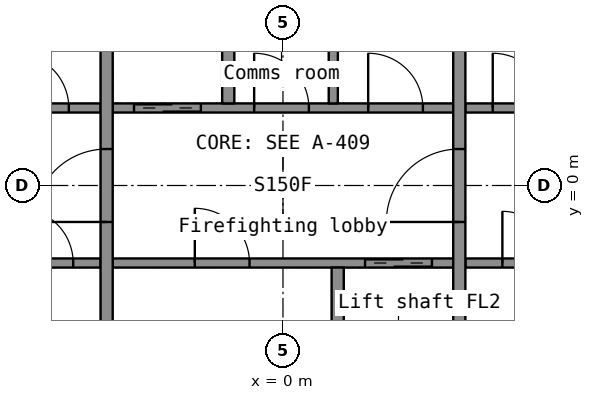
"""IFC4 building model, lengths in metres.
Left out: names, types, materials, properties, quantities, classifications, styles, units other than length and angle.
Written with IfcOpenShell. Run it as: python <this file> out.ifc"""

import sys

from ifc_helpers import new_model, si_unit, direction, frame, frame_2d, origin, place, context, subcontext, project, spatial, rectangle, extrude, element, fill, save


model = new_model("IFC4")
c1 = context("Model", 3, precision=1e-05, world=origin(), true_north=direction((0.0, 1.0)))
c2 = subcontext(c1, "Body", "Model", "MODEL_VIEW")
j1 = project(units=[si_unit("LENGTHUNIT", "METRE"), si_unit("PLANEANGLEUNIT", "RADIAN")], contexts=[c1])
p1 = place(None, origin())
s1 = spatial("IfcSite", under=j1, at=p1, CompositionType="ELEMENT")
p2 = place(p1, origin())
s2 = spatial("IfcBuilding", under=s1, at=p2, CompositionType="ELEMENT")
p3 = place(p2, frame((0.0, 0.0, 55.6)))
s3 = spatial("IfcBuildingStorey", under=s2, at=p3, CompositionType="ELEMENT", Elevation=55.6)
p4 = place(p3, frame((-11.4, -1.275, 0.0), z_axis=(0.0, 0.0, 1.0), x_axis=(1.0, 0.0, 0.0)))
e1 = element("IfcWall", 1, at=p4, inside=s3, PredefinedType="SHEAR", context=c2, shape_type="SweptSolid", body=[
    extrude(rectangle(XDim=8.4, YDim=0.15, at=frame_2d((4.2, 0.0))), origin(), (0.0, 0.0, 1.0), 3.3),
])
p5 = place(p4, frame((5.25, 0.0, 0.0)))
e2 = element("IfcOpeningElement", 2, at=p5, cuts=e1, PredefinedType="OPENING", context=c2, shape_type="SweptSolid", body=[
    extrude(rectangle(XDim=1.1, YDim=2.15, at=frame_2d((0.55, 1.075))), frame((0.0, 0.085, 0.0), z_axis=(0.0, -1.0, 0.0), x_axis=(1.0, 0.0, 0.0)), (0.0, 0.0, 1.0), 0.17),
])
p6 = place(p4, frame((7.05, 0.0, 0.0)))
e3 = element("IfcOpeningElement", 3, at=p6, cuts=e1, PredefinedType="OPENING", context=c2, shape_type="SweptSolid", body=[
    extrude(rectangle(XDim=0.9, YDim=2.1, at=frame_2d((0.45, 1.05))), frame((0.0, 0.085, 0.0), z_axis=(0.0, -1.0, 0.0), x_axis=(1.0, 0.0, 0.0)), (0.0, 0.0, 1.0), 0.17),
])
p7 = place(p3, frame((-2.8, -1.275, 0.0), z_axis=(0.0, 0.0, 1.0), x_axis=(1.0, 0.0, 0.0)))
e4 = element("IfcWall", 4, at=p7, inside=s3, PredefinedType="SHEAR", context=c2, shape_type="SweptSolid", body=[
    extrude(rectangle(XDim=5.6, YDim=0.15, at=frame_2d((2.8, 0.0))), origin(), (0.0, 0.0, 1.0), 3.3),
])
p8 = place(p7, frame((4.15, 0.0, 0.0)))
e5 = element("IfcOpeningElement", 5, at=p8, cuts=e4, PredefinedType="OPENING", context=c2, shape_type="SweptSolid", body=[
    extrude(rectangle(XDim=1.1, YDim=2.2, at=frame_2d((0.55, 1.1))), frame((0.0, 0.085, 0.0), z_axis=(0.0, -1.0, 0.0), x_axis=(1.0, 0.0, 0.0)), (0.0, 0.0, 1.0), 0.17),
])
p9 = place(p7, frame((1.35, 0.0, 0.0)))
e6 = element("IfcOpeningElement", 6, at=p9, cuts=e4, PredefinedType="OPENING", context=c2, shape_type="SweptSolid", body=[
    extrude(rectangle(XDim=0.9, YDim=2.1, at=frame_2d((0.45, 1.05))), frame((0.0, 0.085, 0.0), z_axis=(0.0, -1.0, 0.0), x_axis=(1.0, 0.0, 0.0)), (0.0, 0.0, 1.0), 0.17),
])
p10 = place(p3, frame((3.0, -1.275, 0.0), z_axis=(0.0, 0.0, 1.0), x_axis=(1.0, 0.0, 0.0)))
e7 = element("IfcWall", 7, at=p10, inside=s3, PredefinedType="PARTITIONING", context=c2, shape_type="SweptSolid", body=[
    extrude(rectangle(XDim=8.4, YDim=0.15, at=frame_2d((4.2, 0.0))), origin(), (0.0, 0.0, 1.0), 3.3),
])
p11 = place(p10, frame((0.608, 0.0, 0.0)))
e8 = element("IfcOpeningElement", 8, at=p11, cuts=e7, PredefinedType="OPENING", context=c2, shape_type="SweptSolid", body=[
    extrude(rectangle(XDim=0.85, YDim=2.1, at=frame_2d((0.425, 1.05))), frame((0.0, 0.085, 0.0), z_axis=(0.0, -1.0, 0.0), x_axis=(1.0, 0.0, 0.0)), (0.0, 0.0, 1.0), 0.17),
])
p12 = place(p10, frame((2.825, 0.0, 0.0)))
e9 = element("IfcOpeningElement", 9, at=p12, cuts=e7, PredefinedType="OPENING", context=c2, shape_type="SweptSolid", body=[
    extrude(rectangle(XDim=0.85, YDim=2.1, at=frame_2d((0.425, 1.05))), frame((0.0, 0.085, 0.0), z_axis=(0.0, -1.0, 0.0), x_axis=(1.0, 0.0, 0.0)), (0.0, 0.0, 1.0), 0.17),
])
p13 = place(p10, frame((4.938, 0.0, 0.0)))
e10 = element("IfcOpeningElement", 10, at=p13, cuts=e7, PredefinedType="OPENING", context=c2, shape_type="SweptSolid", body=[
    extrude(rectangle(XDim=0.9, YDim=2.1, at=frame_2d((0.45, 1.05))), frame((0.0, 0.085, 0.0), z_axis=(0.0, -1.0, 0.0), x_axis=(1.0, 0.0, 0.0)), (0.0, 0.0, 1.0), 0.17),
])
p14 = place(p10, frame((6.996, 0.0, 0.0)))
e11 = element("IfcOpeningElement", 11, at=p14, cuts=e7, PredefinedType="OPENING", context=c2, shape_type="SweptSolid", body=[
    extrude(rectangle(XDim=0.9, YDim=2.1, at=frame_2d((0.45, 1.05))), frame((0.0, 0.085, 0.0), z_axis=(0.0, -1.0, 0.0), x_axis=(1.0, 0.0, 0.0)), (0.0, 0.0, 1.0), 0.17),
])
p15 = place(p3, frame((-11.4, 1.275, 0.0), z_axis=(0.0, 0.0, 1.0), x_axis=(1.0, 0.0, 0.0)))
e12 = element("IfcWall", 12, at=p15, inside=s3, PredefinedType="PARTITIONING", context=c2, shape_type="SweptSolid", body=[
    extrude(rectangle(XDim=8.4, YDim=0.15, at=frame_2d((4.2, 0.0))), origin(), (0.0, 0.0, 1.0), 3.3),
])
p16 = place(p15, frame((1.114, 0.0, 0.0)))
e13 = element("IfcOpeningElement", 13, at=p16, cuts=e12, PredefinedType="OPENING", context=c2, shape_type="SweptSolid", body=[
    extrude(rectangle(XDim=0.85, YDim=2.1, at=frame_2d((0.425, 1.05))), frame((0.0, 0.085, 0.0), z_axis=(0.0, -1.0, 0.0), x_axis=(1.0, 0.0, 0.0)), (0.0, 0.0, 1.0), 0.17),
])
p17 = place(p15, frame((4.342, 0.0, 0.0)))
e14 = element("IfcOpeningElement", 14, at=p17, cuts=e12, PredefinedType="OPENING", context=c2, shape_type="SweptSolid", body=[
    extrude(rectangle(XDim=0.85, YDim=2.1, at=frame_2d((0.425, 1.05))), frame((0.0, 0.085, 0.0), z_axis=(0.0, -1.0, 0.0), x_axis=(1.0, 0.0, 0.0)), (0.0, 0.0, 1.0), 0.17),
])
p18 = place(p15, frame((6.978, 0.0, 0.0)))
e15 = element("IfcOpeningElement", 15, at=p18, cuts=e12, PredefinedType="OPENING", context=c2, shape_type="SweptSolid", body=[
    extrude(rectangle(XDim=0.9, YDim=2.1, at=frame_2d((0.45, 1.05))), frame((0.0, 0.085, 0.0), z_axis=(0.0, -1.0, 0.0), x_axis=(1.0, 0.0, 0.0)), (0.0, 0.0, 1.0), 0.17),
])
p19 = place(p3, frame((-2.8, 1.275, 0.0), z_axis=(0.0, 0.0, 1.0), x_axis=(1.0, 0.0, 0.0)))
e16 = element("IfcWall", 16, at=p19, inside=s3, PredefinedType="SHEAR", context=c2, shape_type="SweptSolid", body=[
    extrude(rectangle(XDim=5.6, YDim=0.15, at=frame_2d((2.8, 0.0))), origin(), (0.0, 0.0, 1.0), 3.3),
])
p20 = place(p19, frame((0.35, 0.0, 0.0)))
e17 = element("IfcOpeningElement", 17, at=p20, cuts=e16, PredefinedType="OPENING", context=c2, shape_type="SweptSolid", body=[
    extrude(rectangle(XDim=1.1, YDim=2.2, at=frame_2d((0.55, 1.1))), frame((0.0, 0.085, 0.0), z_axis=(0.0, -1.0, 0.0), x_axis=(1.0, 0.0, 0.0)), (0.0, 0.0, 1.0), 0.17),
])
p21 = place(p19, frame((2.326, 0.0, 0.0)))
e18 = element("IfcOpeningElement", 18, at=p21, cuts=e16, PredefinedType="OPENING", context=c2, shape_type="SweptSolid", body=[
    extrude(rectangle(XDim=0.9, YDim=2.1, at=frame_2d((0.45, 1.05))), frame((0.0, 0.085, 0.0), z_axis=(0.0, -1.0, 0.0), x_axis=(1.0, 0.0, 0.0)), (0.0, 0.0, 1.0), 0.17),
])
p22 = place(p19, frame((4.201, 0.0, 0.0)))
e19 = element("IfcOpeningElement", 19, at=p22, cuts=e16, PredefinedType="OPENING", context=c2, shape_type="SweptSolid", body=[
    extrude(rectangle(XDim=0.9, YDim=2.1, at=frame_2d((0.45, 1.05))), frame((0.0, 0.085, 0.0), z_axis=(0.0, -1.0, 0.0), x_axis=(1.0, 0.0, 0.0)), (0.0, 0.0, 1.0), 0.17),
])
p23 = place(p3, frame((3.0, 1.275, 0.0), z_axis=(0.0, 0.0, 1.0), x_axis=(1.0, 0.0, 0.0)))
e20 = element("IfcWall", 20, at=p23, inside=s3, PredefinedType="SHEAR", context=c2, shape_type="SweptSolid", body=[
    extrude(rectangle(XDim=8.4, YDim=0.15, at=frame_2d((4.2, 0.0))), origin(), (0.0, 0.0, 1.0), 3.3),
])
p24 = place(p23, frame((2.05, 0.0, 0.0)))
e21 = element("IfcOpeningElement", 21, at=p24, cuts=e20, PredefinedType="OPENING", context=c2, shape_type="SweptSolid", body=[
    extrude(rectangle(XDim=1.1, YDim=2.15, at=frame_2d((0.55, 1.075))), frame((0.0, 0.085, 0.0), z_axis=(0.0, -1.0, 0.0), x_axis=(1.0, 0.0, 0.0)), (0.0, 0.0, 1.0), 0.17),
])
p25 = place(p23, frame((0.45, 0.0, 0.0)))
e22 = element("IfcOpeningElement", 22, at=p25, cuts=e20, PredefinedType="OPENING", context=c2, shape_type="SweptSolid", body=[
    extrude(rectangle(XDim=0.9, YDim=2.1, at=frame_2d((0.45, 1.05))), frame((0.0, 0.085, 0.0), z_axis=(0.0, -1.0, 0.0), x_axis=(1.0, 0.0, 0.0)), (0.0, 0.0, 1.0), 0.17),
])
p26 = place(p3, frame((-2.9, -3.7, 0.0), z_axis=(0.0, 0.0, 1.0), x_axis=(0.0, 1.0, 0.0)))
e23 = element("IfcWall", 23, at=p26, inside=s3, PredefinedType="SHEAR", context=c2, shape_type="SweptSolid", body=[
    extrude(rectangle(XDim=7.4, YDim=0.2, at=frame_2d((3.7, 0.0))), origin(), (0.0, 0.0, 1.0), 3.3),
])
p27 = place(p26, frame((3.1, 0.0, 0.0)))
e24 = element("IfcOpeningElement", 24, at=p27, cuts=e23, PredefinedType="OPENING", context=c2, shape_type="SweptSolid", body=[
    extrude(rectangle(XDim=1.2, YDim=2.2, at=frame_2d((0.6, 1.1))), frame((0.0, 0.11, 0.0), z_axis=(0.0, -1.0, 0.0), x_axis=(1.0, 0.0, 0.0)), (0.0, 0.0, 1.0), 0.22),
])
p28 = place(p3, frame((2.9, -3.7, 0.0), z_axis=(0.0, 0.0, 1.0), x_axis=(0.0, 1.0, 0.0)))
e25 = element("IfcWall", 25, at=p28, inside=s3, PredefinedType="SHEAR", context=c2, shape_type="SweptSolid", body=[
    extrude(rectangle(XDim=7.4, YDim=0.2, at=frame_2d((3.7, 0.0))), origin(), (0.0, 0.0, 1.0), 3.3),
])
p29 = place(p28, frame((3.1, 0.0, 0.0)))
e26 = element("IfcOpeningElement", 26, at=p29, cuts=e25, PredefinedType="OPENING", context=c2, shape_type="SweptSolid", body=[
    extrude(rectangle(XDim=1.2, YDim=2.2, at=frame_2d((0.6, 1.1))), frame((0.0, 0.11, 0.0), z_axis=(0.0, -1.0, 0.0), x_axis=(1.0, 0.0, 0.0)), (0.0, 0.0, 1.0), 0.22),
])
for number, where, z_axis, x_axis in (
    (27, (-0.9, 1.35, 0.0), (0.0, 0.0, 1.0), (0.0, 1.0, 0.0)),
    (28, (0.9, -3.7, 0.0), (0.0, 0.0, 1.0), (0.0, 1.0, 0.0)),
):
    element("IfcWall", number, at=place(p3, frame(where, z_axis=z_axis, x_axis=x_axis)), inside=s3, PredefinedType="SHEAR", context=c2, shape_type="SweptSolid", body=[
        extrude(rectangle(XDim=2.35, YDim=0.2, at=frame_2d((1.175, 0.0))), origin(), (0.0, 0.0, 1.0), 3.3),
    ])
p30 = place(p3, frame((0.827, 1.35, 0.0), z_axis=(0.0, 0.0, 1.0), x_axis=(0.0, 1.0, 0.0)))
e29 = element("IfcWall", 29, at=p30, inside=s3, PredefinedType="PARTITIONING", context=c2, shape_type="SweptSolid", body=[
    extrude(rectangle(XDim=2.35, YDim=0.15, at=frame_2d((1.175, 0.0))), origin(), (0.0, 0.0, 1.0), 3.3),
])
p31 = place(p27, origin())
e30 = element("IfcDoor", 30, at=p31, inside=s3, OperationType="SINGLE_SWING_LEFT", PredefinedType="DOOR", context=c2, shape_type="SweptSolid", body=[
    extrude(rectangle(XDim=1.2, YDim=2.2, at=frame_2d((0.6, 1.1))), frame((0.0, 0.025, 0.0), z_axis=(0.0, -1.0, 0.0), x_axis=(1.0, 0.0, 0.0)), (0.0, 0.0, 1.0), 0.05),
])
fill(e24, e30)
p32 = place(p29, origin())
e31 = element("IfcDoor", 31, at=p32, inside=s3, OperationType="SINGLE_SWING_LEFT", PredefinedType="DOOR", context=c2, shape_type="SweptSolid", body=[
    extrude(rectangle(XDim=1.2, YDim=2.2, at=frame_2d((0.6, 1.1))), frame((0.0, 0.025, 0.0), z_axis=(0.0, -1.0, 0.0), x_axis=(1.0, 0.0, 0.0)), (0.0, 0.0, 1.0), 0.05),
])
fill(e26, e31)
p33 = place(p20, origin())
e32 = element("IfcDoor", 32, at=p33, inside=s3, OperationType="DOUBLE_DOOR_SLIDING", PredefinedType="DOOR", context=c2, shape_type="SweptSolid", body=[
    extrude(rectangle(XDim=1.1, YDim=2.2, at=frame_2d((0.55, 1.1))), frame((0.0, 0.025, 0.0), z_axis=(0.0, -1.0, 0.0), x_axis=(1.0, 0.0, 0.0)), (0.0, 0.0, 1.0), 0.05),
])
fill(e17, e32)
p34 = place(p8, origin())
e33 = element("IfcDoor", 33, at=p34, inside=s3, OperationType="DOUBLE_DOOR_SLIDING", PredefinedType="DOOR", context=c2, shape_type="SweptSolid", body=[
    extrude(rectangle(XDim=1.1, YDim=2.2, at=frame_2d((0.55, 1.1))), frame((0.0, 0.025, 0.0), z_axis=(0.0, -1.0, 0.0), x_axis=(1.0, 0.0, 0.0)), (0.0, 0.0, 1.0), 0.05),
])
fill(e5, e33)
p35 = place(p18, origin())
e34 = element("IfcDoor", 34, at=p35, inside=s3, OperationType="SINGLE_SWING_LEFT", PredefinedType="DOOR", context=c2, shape_type="SweptSolid", body=[
    extrude(rectangle(XDim=0.9, YDim=2.1, at=frame_2d((0.45, 1.05))), frame((0.0, 0.025, 0.0), z_axis=(0.0, -1.0, 0.0), x_axis=(1.0, 0.0, 0.0)), (0.0, 0.0, 1.0), 0.05),
])
fill(e15, e34)
p36 = place(p11, origin())
e35 = element("IfcDoor", 35, at=p36, inside=s3, OperationType="SINGLE_SWING_LEFT", PredefinedType="DOOR", context=c2, shape_type="SweptSolid", body=[
    extrude(rectangle(XDim=0.85, YDim=2.1, at=frame_2d((0.425, 1.05))), frame((0.0, 0.025, 0.0), z_axis=(0.0, -1.0, 0.0), x_axis=(1.0, 0.0, 0.0)), (0.0, 0.0, 1.0), 0.05),
])
fill(e8, e35)
p37 = place(p21, origin())
e36 = element("IfcDoor", 36, at=p37, inside=s3, OperationType="SINGLE_SWING_LEFT", PredefinedType="DOOR", context=c2, shape_type="SweptSolid", body=[
    extrude(rectangle(XDim=0.9, YDim=2.1, at=frame_2d((0.45, 1.05))), frame((0.0, 0.025, 0.0), z_axis=(0.0, -1.0, 0.0), x_axis=(1.0, 0.0, 0.0)), (0.0, 0.0, 1.0), 0.05),
])
fill(e18, e36)
p38 = place(p22, origin())
e37 = element("IfcDoor", 37, at=p38, inside=s3, OperationType="SINGLE_SWING_LEFT", PredefinedType="DOOR", context=c2, shape_type="SweptSolid", body=[
    extrude(rectangle(XDim=0.9, YDim=2.1, at=frame_2d((0.45, 1.05))), frame((0.0, 0.025, 0.0), z_axis=(0.0, -1.0, 0.0), x_axis=(1.0, 0.0, 0.0)), (0.0, 0.0, 1.0), 0.05),
])
fill(e19, e37)
p39 = place(p9, origin())
e38 = element("IfcDoor", 38, at=p39, inside=s3, OperationType="SINGLE_SWING_LEFT", PredefinedType="DOOR", context=c2, shape_type="SweptSolid", body=[
    extrude(rectangle(XDim=0.9, YDim=2.1, at=frame_2d((0.45, 1.05))), frame((0.0, 0.025, 0.0), z_axis=(0.0, -1.0, 0.0), x_axis=(1.0, 0.0, 0.0)), (0.0, 0.0, 1.0), 0.05),
])
fill(e6, e38)
p40 = place(p25, origin())
e39 = element("IfcDoor", 39, at=p40, inside=s3, OperationType="SINGLE_SWING_LEFT", PredefinedType="DOOR", context=c2, shape_type="SweptSolid", body=[
    extrude(rectangle(XDim=0.9, YDim=2.1, at=frame_2d((0.45, 1.05))), frame((0.0, 0.025, 0.0), z_axis=(0.0, -1.0, 0.0), x_axis=(1.0, 0.0, 0.0)), (0.0, 0.0, 1.0), 0.05),
])
fill(e22, e39)
p41 = place(p6, origin())
e40 = element("IfcDoor", 40, at=p41, inside=s3, OperationType="SINGLE_SWING_LEFT", PredefinedType="DOOR", context=c2, shape_type="SweptSolid", body=[
    extrude(rectangle(XDim=0.9, YDim=2.1, at=frame_2d((0.45, 1.05))), frame((0.0, 0.025, 0.0), z_axis=(0.0, -1.0, 0.0), x_axis=(1.0, 0.0, 0.0)), (0.0, 0.0, 1.0), 0.05),
])
fill(e3, e40)
save(model, sys.argv[1])
